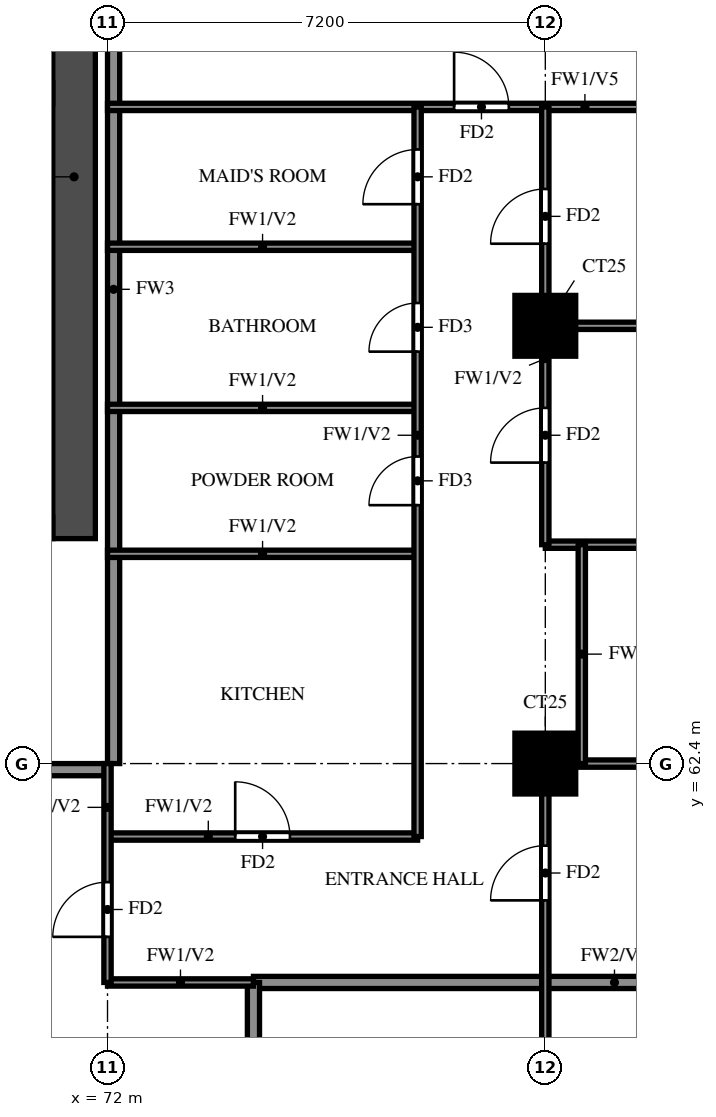
"""IFC4 building model, lengths in metres.
Left out: names, types, materials, properties, quantities, classifications, styles, units other than length and angle.
Written with IfcOpenShell. Run it as: python <this file> out.ifc"""

import sys

from ifc_helpers import new_model, si_unit, direction, frame, frame_2d, origin, origin_2d, place, context, subcontext, project, spatial, rectangle, extrude, source, transform, mapped, element, fill, save


model = new_model("IFC4")
c1 = context("Model", 3, precision=1e-05, world=origin(), true_north=direction((0.0, 1.0)))
c2 = subcontext(c1, "Body", "Model", "MODEL_VIEW")
j1 = project(units=[si_unit("LENGTHUNIT", "METRE"), si_unit("PLANEANGLEUNIT", "RADIAN")], contexts=[c1])
p1 = place(None, origin())
s1 = spatial("IfcSite", under=j1, at=p1, CompositionType="ELEMENT")
p2 = place(p1, origin())
s2 = spatial("IfcBuilding", under=s1, at=p2, CompositionType="ELEMENT")
p3 = place(p2, frame((0.0, 0.0, 150.0)))
s3 = spatial("IfcBuildingStorey", under=s2, at=p3, CompositionType="ELEMENT", Elevation=150.0)
m1 = source(origin(), c2, "Body", "SweptSolid", [
    extrude(rectangle(XDim=1.0, YDim=1.0, at=origin_2d()), origin(), (0.0, 0.0, 1.0), 3.2),
])
for number, where, z_axis, x_axis in (
    (1, (79.2, 62.4, 0.0), (0.0, 0.0, 1.0), (1.0, 0.0, 0.0)),
    (2, (79.2, 69.6, 0.0), (0.0, 0.0, 1.0), (1.0, 0.0, 0.0)),
):
    element("IfcColumn", number, at=place(p3, frame(where, z_axis=z_axis, x_axis=x_axis)), inside=s3, PredefinedType="COLUMN", context=c2, shape_type="MappedRepresentation", body=[
        mapped(m1, transform((0.0, 0.0, 0.0))),
    ])
p4 = place(p3, frame((71.45, 66.1, 0.0), z_axis=(0.0, 0.0, 1.0), x_axis=(0.0, 1.0, 0.0)))
e3 = element("IfcWall", 3, at=p4, inside=s3, PredefinedType="SHEAR", context=c2, shape_type="SweptSolid", body=[
    extrude(rectangle(XDim=11.9, YDim=0.7, at=frame_2d((5.95, 0.0))), origin(), (0.0, 0.0, 1.0), 3.2),
])
p5 = place(p3, frame((29.7, 66.275, 0.0), z_axis=(0.0, 0.0, 1.0), x_axis=(1.0, 0.0, 0.0)))
e4 = element("IfcWall", 4, at=p5, inside=s3, PredefinedType="SHEAR", context=c2, shape_type="SweptSolid", body=[
    extrude(rectangle(XDim=41.4, YDim=0.35, at=frame_2d((20.7, 0.0))), origin(), (0.0, 0.0, 1.0), 3.2),
])
p6 = place(p5, frame((0.925, 0.0, 0.0)))
e5 = element("IfcOpeningElement", 5, at=p6, cuts=e4, PredefinedType="OPENING", context=c2, shape_type="SweptSolid", body=[
    extrude(rectangle(XDim=1.1, YDim=2.1, at=frame_2d((0.55, 1.05))), frame((0.0, 0.185, 0.0), z_axis=(0.0, -1.0, 0.0), x_axis=(1.0, 0.0, 0.0)), (0.0, 0.0, 1.0), 0.37),
])
p7 = place(p5, frame((3.712, 0.0, 0.0)))
e6 = element("IfcOpeningElement", 6, at=p7, cuts=e4, PredefinedType="OPENING", context=c2, shape_type="SweptSolid", body=[
    extrude(rectangle(XDim=1.8, YDim=2.1, at=frame_2d((0.9, 1.05))), frame((0.0, 0.185, 0.0), z_axis=(0.0, -1.0, 0.0), x_axis=(1.0, 0.0, 0.0)), (0.0, 0.0, 1.0), 0.37),
])
p8 = place(p3, frame((67.2, 62.3, 0.0), z_axis=(0.0, 0.0, 1.0), x_axis=(1.0, 0.0, 0.0)))
e7 = element("IfcWall", 7, at=p8, inside=s3, PredefinedType="SOLIDWALL", context=c2, shape_type="SweptSolid", body=[
    extrude(rectangle(XDim=4.8, YDim=0.2, at=frame_2d((2.4, 0.0))), origin(), (0.0, 0.0, 1.0), 3.2),
])
p9 = place(p3, frame((72.1, 62.4, 0.0), z_axis=(0.0, 0.0, 1.0), x_axis=(0.0, 1.0, 0.0)))
e8 = element("IfcWall", 8, at=p9, inside=s3, PredefinedType="SOLIDWALL", context=c2, shape_type="SweptSolid", body=[
    extrude(rectangle(XDim=15.6, YDim=0.2, at=frame_2d((7.8, 0.0))), origin(), (0.0, 0.0, 1.0), 3.2),
])
p10 = place(p3, frame((74.4, 58.8, 0.0), z_axis=(0.0, 0.0, 1.0), x_axis=(1.0, 0.0, 0.0)))
e9 = element("IfcWall", 9, at=p10, inside=s3, PredefinedType="SOLIDWALL", context=c2, shape_type="SweptSolid", body=[
    extrude(rectangle(XDim=11.875, YDim=0.2, at=frame_2d((5.938, 0.0))), origin(), (0.0, 0.0, 1.0), 2.3),
])
p11 = place(p3, frame((74.4, 56.4, 0.0), z_axis=(0.0, 0.0, 1.0), x_axis=(0.0, 1.0, 0.0)))
e10 = element("IfcWall", 10, at=p11, inside=s3, PredefinedType="SOLIDWALL", context=c2, shape_type="SweptSolid", body=[
    extrude(rectangle(XDim=2.4, YDim=0.2, at=frame_2d((1.2, 0.0))), origin(), (0.0, 0.0, 1.0), 3.2),
])
p12 = place(p3, frame((72.0, 58.8, 0.0), z_axis=(0.0, 0.0, 1.0), x_axis=(1.0, 0.0, 0.0)))
e11 = element("IfcWall", 11, at=p12, inside=s3, PredefinedType="PARTITIONING", context=c2, shape_type="SweptSolid", body=[
    extrude(rectangle(XDim=2.4, YDim=0.12, at=frame_2d((1.2, 0.0))), origin(), (0.0, 0.0, 1.0), 3.2),
])
p13 = place(p3, frame((72.0, 61.2, 0.0), z_axis=(0.0, 0.0, 1.0), x_axis=(1.0, 0.0, 0.0)))
e12 = element("IfcWall", 12, at=p13, inside=s3, PredefinedType="PARTITIONING", context=c2, shape_type="SweptSolid", body=[
    extrude(rectangle(XDim=5.1, YDim=0.12, at=frame_2d((2.55, 0.0))), origin(), (0.0, 0.0, 1.0), 3.2),
])
p14 = place(p13, frame((2.1, 0.0, 0.0)))
e13 = element("IfcOpeningElement", 13, at=p14, cuts=e12, PredefinedType="OPENING", context=c2, shape_type="SweptSolid", body=[
    extrude(rectangle(XDim=0.9, YDim=2.1, at=frame_2d((0.45, 1.05))), frame((0.0, 0.07, 0.0), z_axis=(0.0, -1.0, 0.0), x_axis=(1.0, 0.0, 0.0)), (0.0, 0.0, 1.0), 0.14),
])
p15 = place(p3, frame((79.2, 62.4, 0.0), z_axis=(0.0, 0.0, 1.0), x_axis=(1.0, 0.0, 0.0)))
e14 = element("IfcWall", 14, at=p15, inside=s3, PredefinedType="PARTITIONING", context=c2, shape_type="SweptSolid", body=[
    extrude(rectangle(XDim=7.075, YDim=0.12, at=frame_2d((3.538, 0.0))), origin(), (0.0, 0.0, 1.0), 3.2),
])
p16 = place(p15, frame((3.438, 0.0, 0.0)))
e15 = element("IfcOpeningElement", 15, at=p16, cuts=e14, PredefinedType="OPENING", context=c2, shape_type="SweptSolid", body=[
    extrude(rectangle(XDim=0.8, YDim=2.1, at=frame_2d((0.4, 1.05))), frame((0.0, 0.07, 0.0), z_axis=(0.0, -1.0, 0.0), x_axis=(1.0, 0.0, 0.0)), (0.0, 0.0, 1.0), 0.14),
])
p17 = place(p3, frame((72.0, 65.85, 0.0), z_axis=(0.0, 0.0, 1.0), x_axis=(1.0, 0.0, 0.0)))
e16 = element("IfcWall", 16, at=p17, inside=s3, PredefinedType="PARTITIONING", context=c2, shape_type="SweptSolid", body=[
    extrude(rectangle(XDim=5.1, YDim=0.12, at=frame_2d((2.55, 0.0))), origin(), (0.0, 0.0, 1.0), 3.2),
])
p18 = place(p3, frame((79.2, 66.0, 0.0), z_axis=(0.0, 0.0, 1.0), x_axis=(1.0, 0.0, 0.0)))
e17 = element("IfcWall", 17, at=p18, inside=s3, PredefinedType="PARTITIONING", context=c2, shape_type="SweptSolid", body=[
    extrude(rectangle(XDim=7.075, YDim=0.12, at=frame_2d((3.538, 0.0))), origin(), (0.0, 0.0, 1.0), 2.3),
])
p19 = place(p3, frame((72.0, 68.25, 0.0), z_axis=(0.0, 0.0, 1.0), x_axis=(1.0, 0.0, 0.0)))
e18 = element("IfcWall", 18, at=p19, inside=s3, PredefinedType="PARTITIONING", context=c2, shape_type="SweptSolid", body=[
    extrude(rectangle(XDim=5.1, YDim=0.12, at=frame_2d((2.55, 0.0))), origin(), (0.0, 0.0, 1.0), 3.2),
])
p20 = place(p3, frame((79.2, 69.6, 0.0), z_axis=(0.0, 0.0, 1.0), x_axis=(1.0, 0.0, 0.0)))
e19 = element("IfcWall", 19, at=p20, inside=s3, PredefinedType="PARTITIONING", context=c2, shape_type="SweptSolid", body=[
    extrude(rectangle(XDim=7.075, YDim=0.12, at=frame_2d((3.538, 0.0))), origin(), (0.0, 0.0, 1.0), 3.2),
])
p21 = place(p3, frame((72.0, 70.9, 0.0), z_axis=(0.0, 0.0, 1.0), x_axis=(1.0, 0.0, 0.0)))
e20 = element("IfcWall", 20, at=p21, inside=s3, PredefinedType="PARTITIONING", context=c2, shape_type="SweptSolid", body=[
    extrude(rectangle(XDim=5.1, YDim=0.12, at=frame_2d((2.55, 0.0))), origin(), (0.0, 0.0, 1.0), 3.2),
])
p22 = place(p3, frame((72.0, 73.2, 0.0), z_axis=(0.0, 0.0, 1.0), x_axis=(1.0, 0.0, 0.0)))
e21 = element("IfcWall", 21, at=p22, inside=s3, PredefinedType="PARTITIONING", context=c2, shape_type="SweptSolid", body=[
    extrude(rectangle(XDim=14.275, YDim=0.12, at=frame_2d((7.137, 0.0))), origin(), (0.0, 0.0, 1.0), 2.3),
])
p23 = place(p22, frame((5.7, 0.0, 0.0)))
e22 = element("IfcOpeningElement", 22, at=p23, cuts=e21, PredefinedType="OPENING", context=c2, shape_type="SweptSolid", body=[
    extrude(rectangle(XDim=0.9, YDim=2.1, at=frame_2d((0.45, 1.05))), frame((0.0, 0.07, 0.0), z_axis=(0.0, -1.0, 0.0), x_axis=(1.0, 0.0, 0.0)), (0.0, 0.0, 1.0), 0.14),
])
p24 = place(p3, frame((72.0, 58.8, 0.0), z_axis=(0.0, 0.0, 1.0), x_axis=(0.0, 1.0, 0.0)))
e23 = element("IfcWall", 23, at=p24, inside=s3, PredefinedType="PARTITIONING", context=c2, shape_type="SweptSolid", body=[
    extrude(rectangle(XDim=3.6, YDim=0.12, at=frame_2d((1.8, 0.0))), origin(), (0.0, 0.0, 1.0), 3.2),
])
p25 = place(p24, frame((0.75, 0.0, 0.0)))
e24 = element("IfcOpeningElement", 24, at=p25, cuts=e23, PredefinedType="OPENING", context=c2, shape_type="SweptSolid", body=[
    extrude(rectangle(XDim=0.9, YDim=2.1, at=frame_2d((0.45, 1.05))), frame((0.0, 0.07, 0.0), z_axis=(0.0, -1.0, 0.0), x_axis=(1.0, 0.0, 0.0)), (0.0, 0.0, 1.0), 0.14),
])
p26 = place(p3, frame((77.1, 61.2, 0.0), z_axis=(0.0, 0.0, 1.0), x_axis=(0.0, 1.0, 0.0)))
e25 = element("IfcWall", 25, at=p26, inside=s3, PredefinedType="PARTITIONING", context=c2, shape_type="SweptSolid", body=[
    extrude(rectangle(XDim=12.0, YDim=0.12, at=frame_2d((6.0, 0.0))), origin(), (0.0, 0.0, 1.0), 3.2),
])
p27 = place(p26, frame((5.45, 0.0, 0.0)))
e26 = element("IfcOpeningElement", 26, at=p27, cuts=e25, PredefinedType="OPENING", context=c2, shape_type="SweptSolid", body=[
    extrude(rectangle(XDim=0.8, YDim=2.1, at=frame_2d((0.4, 1.05))), frame((0.0, 0.07, 0.0), z_axis=(0.0, -1.0, 0.0), x_axis=(1.0, 0.0, 0.0)), (0.0, 0.0, 1.0), 0.14),
])
p28 = place(p26, frame((7.975, 0.0, 0.0)))
e27 = element("IfcOpeningElement", 27, at=p28, cuts=e25, PredefinedType="OPENING", context=c2, shape_type="SweptSolid", body=[
    extrude(rectangle(XDim=0.8, YDim=2.1, at=frame_2d((0.4, 1.05))), frame((0.0, 0.07, 0.0), z_axis=(0.0, -1.0, 0.0), x_axis=(1.0, 0.0, 0.0)), (0.0, 0.0, 1.0), 0.14),
])
p29 = place(p26, frame((10.4, 0.0, 0.0)))
e28 = element("IfcOpeningElement", 28, at=p29, cuts=e25, PredefinedType="OPENING", context=c2, shape_type="SweptSolid", body=[
    extrude(rectangle(XDim=0.9, YDim=2.1, at=frame_2d((0.45, 1.05))), frame((0.0, 0.07, 0.0), z_axis=(0.0, -1.0, 0.0), x_axis=(1.0, 0.0, 0.0)), (0.0, 0.0, 1.0), 0.14),
])
p30 = place(p3, frame((79.2, 48.125, 0.0), z_axis=(0.0, 0.0, 1.0), x_axis=(0.0, 1.0, 0.0)))
e29 = element("IfcWall", 29, at=p30, inside=s3, PredefinedType="PARTITIONING", context=c2, shape_type="SweptSolid", body=[
    extrude(rectangle(XDim=14.275, YDim=0.12, at=frame_2d((7.137, 0.0))), origin(), (0.0, 0.0, 1.0), 3.2),
])
p31 = place(p30, frame((1.288, 0.0, 0.0)))
e30 = element("IfcOpeningElement", 30, at=p31, cuts=e29, PredefinedType="OPENING", context=c2, shape_type="SweptSolid", body=[
    extrude(rectangle(XDim=0.9, YDim=2.1, at=frame_2d((0.45, 1.05))), frame((0.0, 0.07, 0.0), z_axis=(0.0, -1.0, 0.0), x_axis=(1.0, 0.0, 0.0)), (0.0, 0.0, 1.0), 0.14),
])
p32 = place(p30, frame((7.825, 0.0, 0.0)))
e31 = element("IfcOpeningElement", 31, at=p32, cuts=e29, PredefinedType="OPENING", context=c2, shape_type="SweptSolid", body=[
    extrude(rectangle(XDim=1.5, YDim=2.1, at=frame_2d((0.75, 1.05))), frame((0.0, 0.07, 0.0), z_axis=(0.0, -1.0, 0.0), x_axis=(1.0, 0.0, 0.0)), (0.0, 0.0, 1.0), 0.14),
])
p33 = place(p30, frame((12.025, 0.0, 0.0)))
e32 = element("IfcOpeningElement", 32, at=p33, cuts=e29, PredefinedType="OPENING", context=c2, shape_type="SweptSolid", body=[
    extrude(rectangle(XDim=0.9, YDim=2.1, at=frame_2d((0.45, 1.05))), frame((0.0, 0.07, 0.0), z_axis=(0.0, -1.0, 0.0), x_axis=(1.0, 0.0, 0.0)), (0.0, 0.0, 1.0), 0.14),
])
p34 = place(p3, frame((79.2, 66.0, 0.0), z_axis=(0.0, 0.0, 1.0), x_axis=(0.0, 1.0, 0.0)))
e33 = element("IfcWall", 33, at=p34, inside=s3, PredefinedType="PARTITIONING", context=c2, shape_type="SweptSolid", body=[
    extrude(rectangle(XDim=7.2, YDim=0.12, at=frame_2d((3.6, 0.0))), origin(), (0.0, 0.0, 1.0), 3.2),
])
p35 = place(p34, frame((1.35, 0.0, 0.0)))
e34 = element("IfcOpeningElement", 34, at=p35, cuts=e33, PredefinedType="OPENING", context=c2, shape_type="SweptSolid", body=[
    extrude(rectangle(XDim=0.9, YDim=2.1, at=frame_2d((0.45, 1.05))), frame((0.0, 0.07, 0.0), z_axis=(0.0, -1.0, 0.0), x_axis=(1.0, 0.0, 0.0)), (0.0, 0.0, 1.0), 0.14),
])
p36 = place(p34, frame((4.95, 0.0, 0.0)))
e35 = element("IfcOpeningElement", 35, at=p36, cuts=e33, PredefinedType="OPENING", context=c2, shape_type="SweptSolid", body=[
    extrude(rectangle(XDim=0.9, YDim=2.1, at=frame_2d((0.45, 1.05))), frame((0.0, 0.07, 0.0), z_axis=(0.0, -1.0, 0.0), x_axis=(1.0, 0.0, 0.0)), (0.0, 0.0, 1.0), 0.14),
])
p37 = place(p3, frame((79.8, 62.4, 0.0), z_axis=(0.0, 0.0, 1.0), x_axis=(0.0, 1.0, 0.0)))
e36 = element("IfcWall", 36, at=p37, inside=s3, PredefinedType="PARTITIONING", context=c2, shape_type="SweptSolid", body=[
    extrude(rectangle(XDim=3.6, YDim=0.12, at=frame_2d((1.8, 0.0))), origin(), (0.0, 0.0, 1.0), 3.2),
])
p38 = place(p25, origin())
e37 = element("IfcDoor", 37, at=p38, inside=s3, OperationType="SINGLE_SWING_LEFT", PredefinedType="DOOR", context=c2, shape_type="SweptSolid", body=[
    extrude(rectangle(XDim=0.9, YDim=2.1, at=frame_2d((0.45, 1.05))), frame((0.0, 0.025, 0.0), z_axis=(0.0, -1.0, 0.0), x_axis=(1.0, 0.0, 0.0)), (0.0, 0.0, 1.0), 0.05),
])
fill(e24, e37)
p39 = place(p33, origin())
e38 = element("IfcDoor", 38, at=p39, inside=s3, OperationType="SINGLE_SWING_LEFT", PredefinedType="DOOR", context=c2, shape_type="SweptSolid", body=[
    extrude(rectangle(XDim=0.9, YDim=2.1, at=frame_2d((0.45, 1.05))), frame((0.0, 0.025, 0.0), z_axis=(0.0, -1.0, 0.0), x_axis=(1.0, 0.0, 0.0)), (0.0, 0.0, 1.0), 0.05),
])
fill(e32, e38)
p40 = place(p35, origin())
e39 = element("IfcDoor", 39, at=p40, inside=s3, OperationType="SINGLE_SWING_RIGHT", PredefinedType="DOOR", context=c2, shape_type="SweptSolid", body=[
    extrude(rectangle(XDim=0.9, YDim=2.1, at=frame_2d((0.45, 1.05))), frame((0.0, 0.025, 0.0), z_axis=(0.0, -1.0, 0.0), x_axis=(1.0, 0.0, 0.0)), (0.0, 0.0, 1.0), 0.05),
])
fill(e34, e39)
p41 = place(p36, origin())
e40 = element("IfcDoor", 40, at=p41, inside=s3, OperationType="SINGLE_SWING_LEFT", PredefinedType="DOOR", context=c2, shape_type="SweptSolid", body=[
    extrude(rectangle(XDim=0.9, YDim=2.1, at=frame_2d((0.45, 1.05))), frame((0.0, 0.025, 0.0), z_axis=(0.0, -1.0, 0.0), x_axis=(1.0, 0.0, 0.0)), (0.0, 0.0, 1.0), 0.05),
])
fill(e35, e40)
p42 = place(p23, origin())
e41 = element("IfcDoor", 41, at=p42, inside=s3, OperationType="SINGLE_SWING_LEFT", PredefinedType="DOOR", context=c2, shape_type="SweptSolid", body=[
    extrude(rectangle(XDim=0.9, YDim=2.1, at=frame_2d((0.45, 1.05))), frame((0.0, 0.025, 0.0), z_axis=(0.0, -1.0, 0.0), x_axis=(1.0, 0.0, 0.0)), (0.0, 0.0, 1.0), 0.05),
])
fill(e22, e41)
p43 = place(p14, origin())
e42 = element("IfcDoor", 42, at=p43, inside=s3, OperationType="SINGLE_SWING_RIGHT", PredefinedType="DOOR", context=c2, shape_type="SweptSolid", body=[
    extrude(rectangle(XDim=0.9, YDim=2.1, at=frame_2d((0.45, 1.05))), frame((0.0, 0.025, 0.0), z_axis=(0.0, -1.0, 0.0), x_axis=(1.0, 0.0, 0.0)), (0.0, 0.0, 1.0), 0.05),
])
fill(e13, e42)
p44 = place(p27, origin())
e43 = element("IfcDoor", 43, at=p44, inside=s3, OperationType="SINGLE_SWING_LEFT", PredefinedType="DOOR", context=c2, shape_type="SweptSolid", body=[
    extrude(rectangle(XDim=0.8, YDim=2.1, at=frame_2d((0.4, 1.05))), frame((0.0, 0.025, 0.0), z_axis=(0.0, -1.0, 0.0), x_axis=(1.0, 0.0, 0.0)), (0.0, 0.0, 1.0), 0.05),
])
fill(e26, e43)
p45 = place(p28, origin())
e44 = element("IfcDoor", 44, at=p45, inside=s3, OperationType="SINGLE_SWING_LEFT", PredefinedType="DOOR", context=c2, shape_type="SweptSolid", body=[
    extrude(rectangle(XDim=0.8, YDim=2.1, at=frame_2d((0.4, 1.05))), frame((0.0, 0.025, 0.0), z_axis=(0.0, -1.0, 0.0), x_axis=(1.0, 0.0, 0.0)), (0.0, 0.0, 1.0), 0.05),
])
fill(e27, e44)
p46 = place(p29, origin())
e45 = element("IfcDoor", 45, at=p46, inside=s3, OperationType="SINGLE_SWING_RIGHT", PredefinedType="DOOR", context=c2, shape_type="SweptSolid", body=[
    extrude(rectangle(XDim=0.9, YDim=2.1, at=frame_2d((0.45, 1.05))), frame((0.0, 0.025, 0.0), z_axis=(0.0, -1.0, 0.0), x_axis=(1.0, 0.0, 0.0)), (0.0, 0.0, 1.0), 0.05),
])
fill(e28, e45)
save(model, sys.argv[1])
